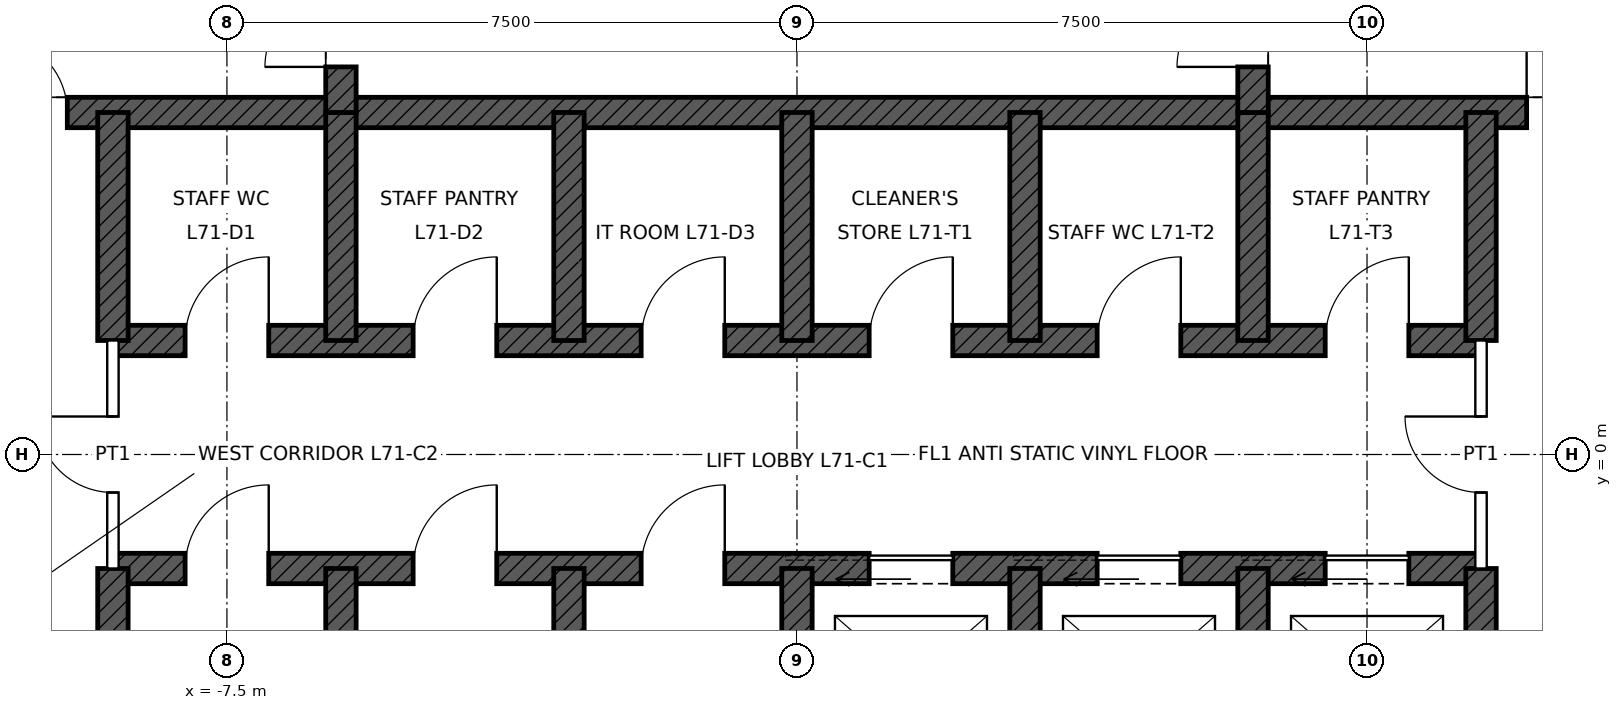
"""IFC4 building model, lengths in metres.
Left out: names, types, materials, properties, quantities, classifications, styles, units other than length and angle.
Written with IfcOpenShell. Run it as: python <this file> out.ifc"""

import sys

from ifc_helpers import new_model, si_unit, direction, frame, frame_2d, origin, place, context, subcontext, project, spatial, rectangle, extrude, element, fill, save


model = new_model("IFC4")
c1 = context("Model", 3, precision=1e-05, world=origin(), true_north=direction((0.0, 1.0)))
c2 = subcontext(c1, "Body", "Model", "MODEL_VIEW")
j1 = project(units=[si_unit("LENGTHUNIT", "METRE"), si_unit("PLANEANGLEUNIT", "RADIAN")], contexts=[c1])
p1 = place(None, origin())
s1 = spatial("IfcSite", under=j1, at=p1, CompositionType="ELEMENT")
p2 = place(p1, origin())
s2 = spatial("IfcBuilding", under=s1, at=p2, CompositionType="ELEMENT")
p3 = place(p2, frame((0.0, 0.0, 319.9)))
s3 = spatial("IfcBuildingStorey", under=s2, at=p3, CompositionType="ELEMENT", Elevation=319.9)
p4 = place(p3, frame((-11.0, 4.5, 0.0), z_axis=(0.0, 0.0, 1.0), x_axis=(1.0, 0.0, 0.0)))
e1 = element("IfcWall", 1, at=p4, inside=s3, PredefinedType="SHEAR", context=c2, shape_type="SweptSolid", body=[
    extrude(rectangle(XDim=22.0, YDim=0.4, at=frame_2d((11.0, 0.0))), origin(), (0.0, 0.0, 1.0), 4.0),
])
p5 = place(p4, frame((0.4, 0.0, 0.0)))
e2 = element("IfcOpeningElement", 2, at=p5, cuts=e1, PredefinedType="OPENING", context=c2, shape_type="SweptSolid", body=[
    extrude(rectangle(XDim=1.0, YDim=2.1, at=frame_2d((0.5, 1.05))), frame((0.0, 0.21, 0.0), z_axis=(0.0, -1.0, 0.0), x_axis=(1.0, 0.0, 0.0)), (0.0, 0.0, 1.0), 0.42),
])
p6 = place(p4, frame((20.6, 0.0, 0.0)))
e3 = element("IfcOpeningElement", 3, at=p6, cuts=e1, PredefinedType="OPENING", context=c2, shape_type="SweptSolid", body=[
    extrude(rectangle(XDim=1.0, YDim=2.1, at=frame_2d((0.5, 1.05))), frame((0.0, 0.21, 0.0), z_axis=(0.0, -1.0, 0.0), x_axis=(1.0, 0.0, 0.0)), (0.0, 0.0, 1.0), 0.42),
])
p7 = place(p3, frame((-9.0, 1.5, 0.0), z_axis=(0.0, 0.0, 1.0), x_axis=(1.0, 0.0, 0.0)))
e4 = element("IfcWall", 4, at=p7, inside=s3, PredefinedType="SHEAR", context=c2, shape_type="SweptSolid", body=[
    extrude(rectangle(XDim=18.0, YDim=0.4, at=frame_2d((9.0, 0.0))), origin(), (0.0, 0.0, 1.0), 4.0),
])
p8 = place(p7, frame((0.95, 0.0, 0.0)))
e5 = element("IfcOpeningElement", 5, at=p8, cuts=e4, PredefinedType="OPENING", context=c2, shape_type="SweptSolid", body=[
    extrude(rectangle(XDim=1.1, YDim=2.1, at=frame_2d((0.55, 1.05))), frame((0.0, 0.21, 0.0), z_axis=(0.0, -1.0, 0.0), x_axis=(1.0, 0.0, 0.0)), (0.0, 0.0, 1.0), 0.42),
])
p9 = place(p7, frame((3.95, 0.0, 0.0)))
e6 = element("IfcOpeningElement", 6, at=p9, cuts=e4, PredefinedType="OPENING", context=c2, shape_type="SweptSolid", body=[
    extrude(rectangle(XDim=1.1, YDim=2.1, at=frame_2d((0.55, 1.05))), frame((0.0, 0.21, 0.0), z_axis=(0.0, -1.0, 0.0), x_axis=(1.0, 0.0, 0.0)), (0.0, 0.0, 1.0), 0.42),
])
p10 = place(p7, frame((6.95, 0.0, 0.0)))
e7 = element("IfcOpeningElement", 7, at=p10, cuts=e4, PredefinedType="OPENING", context=c2, shape_type="SweptSolid", body=[
    extrude(rectangle(XDim=1.1, YDim=2.1, at=frame_2d((0.55, 1.05))), frame((0.0, 0.21, 0.0), z_axis=(0.0, -1.0, 0.0), x_axis=(1.0, 0.0, 0.0)), (0.0, 0.0, 1.0), 0.42),
])
p11 = place(p7, frame((9.95, 0.0, 0.0)))
e8 = element("IfcOpeningElement", 8, at=p11, cuts=e4, PredefinedType="OPENING", context=c2, shape_type="SweptSolid", body=[
    extrude(rectangle(XDim=1.1, YDim=2.1, at=frame_2d((0.55, 1.05))), frame((0.0, 0.21, 0.0), z_axis=(0.0, -1.0, 0.0), x_axis=(1.0, 0.0, 0.0)), (0.0, 0.0, 1.0), 0.42),
])
p12 = place(p7, frame((12.95, 0.0, 0.0)))
e9 = element("IfcOpeningElement", 9, at=p12, cuts=e4, PredefinedType="OPENING", context=c2, shape_type="SweptSolid", body=[
    extrude(rectangle(XDim=1.1, YDim=2.1, at=frame_2d((0.55, 1.05))), frame((0.0, 0.21, 0.0), z_axis=(0.0, -1.0, 0.0), x_axis=(1.0, 0.0, 0.0)), (0.0, 0.0, 1.0), 0.42),
])
p13 = place(p7, frame((15.95, 0.0, 0.0)))
e10 = element("IfcOpeningElement", 10, at=p13, cuts=e4, PredefinedType="OPENING", context=c2, shape_type="SweptSolid", body=[
    extrude(rectangle(XDim=1.1, YDim=2.1, at=frame_2d((0.55, 1.05))), frame((0.0, 0.21, 0.0), z_axis=(0.0, -1.0, 0.0), x_axis=(1.0, 0.0, 0.0)), (0.0, 0.0, 1.0), 0.42),
])
p14 = place(p3, frame((-9.0, -1.5, 0.0), z_axis=(0.0, 0.0, 1.0), x_axis=(1.0, 0.0, 0.0)))
e11 = element("IfcWall", 11, at=p14, inside=s3, PredefinedType="SHEAR", context=c2, shape_type="SweptSolid", body=[
    extrude(rectangle(XDim=18.0, YDim=0.4, at=frame_2d((9.0, 0.0))), origin(), (0.0, 0.0, 1.0), 4.0),
])
p15 = place(p14, frame((9.95, 0.0, 0.0)))
e12 = element("IfcOpeningElement", 12, at=p15, cuts=e11, PredefinedType="OPENING", context=c2, shape_type="SweptSolid", body=[
    extrude(rectangle(XDim=1.1, YDim=2.1, at=frame_2d((0.55, 1.05))), frame((0.0, 0.21, 0.0), z_axis=(0.0, -1.0, 0.0), x_axis=(1.0, 0.0, 0.0)), (0.0, 0.0, 1.0), 0.42),
])
p16 = place(p14, frame((12.95, 0.0, 0.0)))
e13 = element("IfcOpeningElement", 13, at=p16, cuts=e11, PredefinedType="OPENING", context=c2, shape_type="SweptSolid", body=[
    extrude(rectangle(XDim=1.1, YDim=2.1, at=frame_2d((0.55, 1.05))), frame((0.0, 0.21, 0.0), z_axis=(0.0, -1.0, 0.0), x_axis=(1.0, 0.0, 0.0)), (0.0, 0.0, 1.0), 0.42),
])
p17 = place(p14, frame((15.95, 0.0, 0.0)))
e14 = element("IfcOpeningElement", 14, at=p17, cuts=e11, PredefinedType="OPENING", context=c2, shape_type="SweptSolid", body=[
    extrude(rectangle(XDim=1.1, YDim=2.1, at=frame_2d((0.55, 1.05))), frame((0.0, 0.21, 0.0), z_axis=(0.0, -1.0, 0.0), x_axis=(1.0, 0.0, 0.0)), (0.0, 0.0, 1.0), 0.42),
])
p18 = place(p14, frame((0.95, 0.0, 0.0)))
e15 = element("IfcOpeningElement", 15, at=p18, cuts=e11, PredefinedType="OPENING", context=c2, shape_type="SweptSolid", body=[
    extrude(rectangle(XDim=1.1, YDim=2.1, at=frame_2d((0.55, 1.05))), frame((0.0, 0.21, 0.0), z_axis=(0.0, -1.0, 0.0), x_axis=(1.0, 0.0, 0.0)), (0.0, 0.0, 1.0), 0.42),
])
p19 = place(p14, frame((3.95, 0.0, 0.0)))
e16 = element("IfcOpeningElement", 16, at=p19, cuts=e11, PredefinedType="OPENING", context=c2, shape_type="SweptSolid", body=[
    extrude(rectangle(XDim=1.1, YDim=2.1, at=frame_2d((0.55, 1.05))), frame((0.0, 0.21, 0.0), z_axis=(0.0, -1.0, 0.0), x_axis=(1.0, 0.0, 0.0)), (0.0, 0.0, 1.0), 0.42),
])
p20 = place(p14, frame((6.95, 0.0, 0.0)))
e17 = element("IfcOpeningElement", 17, at=p20, cuts=e11, PredefinedType="OPENING", context=c2, shape_type="SweptSolid", body=[
    extrude(rectangle(XDim=1.1, YDim=2.1, at=frame_2d((0.55, 1.05))), frame((0.0, 0.21, 0.0), z_axis=(0.0, -1.0, 0.0), x_axis=(1.0, 0.0, 0.0)), (0.0, 0.0, 1.0), 0.42),
])
for number, where, z_axis, x_axis in (
    (18, (-9.0, 1.5, 0.0), (0.0, 0.0, 1.0), (0.0, 1.0, 0.0)),
    (19, (9.0, 1.5, 0.0), (0.0, 0.0, 1.0), (0.0, 1.0, 0.0)),
    (20, (-9.0, -4.5, 0.0), (0.0, 0.0, 1.0), (0.0, 1.0, 0.0)),
    (21, (9.0, -4.5, 0.0), (0.0, 0.0, 1.0), (0.0, 1.0, 0.0)),
    (22, (-6.0, 1.5, 0.0), (0.0, 0.0, 1.0), (0.0, 1.0, 0.0)),
    (23, (-3.0, 1.5, 0.0), (0.0, 0.0, 1.0), (0.0, 1.0, 0.0)),
    (24, (0.0, 1.5, 0.0), (0.0, 0.0, 1.0), (0.0, 1.0, 0.0)),
    (25, (3.0, 1.5, 0.0), (0.0, 0.0, 1.0), (0.0, 1.0, 0.0)),
    (26, (6.0, 1.5, 0.0), (0.0, 0.0, 1.0), (0.0, 1.0, 0.0)),
    (27, (-6.0, -4.5, 0.0), (0.0, 0.0, 1.0), (0.0, 1.0, 0.0)),
    (28, (-3.0, -4.5, 0.0), (0.0, 0.0, 1.0), (0.0, 1.0, 0.0)),
    (29, (0.0, -4.5, 0.0), (0.0, 0.0, 1.0), (0.0, 1.0, 0.0)),
    (30, (3.0, -4.5, 0.0), (0.0, 0.0, 1.0), (0.0, 1.0, 0.0)),
    (31, (6.0, -4.5, 0.0), (0.0, 0.0, 1.0), (0.0, 1.0, 0.0)),
):
    element("IfcWall", number, at=place(p3, frame(where, z_axis=z_axis, x_axis=x_axis)), inside=s3, PredefinedType="SHEAR", context=c2, shape_type="SweptSolid", body=[
        extrude(rectangle(XDim=3.0, YDim=0.4, at=frame_2d((1.5, 0.0))), origin(), (0.0, 0.0, 1.0), 4.0),
    ])
p21 = place(p3, frame((-6.0, 4.5, 0.0), z_axis=(0.0, 0.0, 1.0), x_axis=(0.0, 1.0, 0.0)))
e32 = element("IfcWall", 32, at=p21, inside=s3, PredefinedType="SHEAR", context=c2, shape_type="SweptSolid", body=[
    extrude(rectangle(XDim=6.5, YDim=0.4, at=frame_2d((3.25, 0.0))), origin(), (0.0, 0.0, 1.0), 4.0),
])
p22 = place(p21, frame((0.6, 0.0, 0.0)))
e33 = element("IfcOpeningElement", 33, at=p22, cuts=e32, PredefinedType="OPENING", context=c2, shape_type="SweptSolid", body=[
    extrude(rectangle(XDim=1.0, YDim=2.1, at=frame_2d((0.5, 1.05))), frame((0.0, 0.21, 0.0), z_axis=(0.0, -1.0, 0.0), x_axis=(1.0, 0.0, 0.0)), (0.0, 0.0, 1.0), 0.42),
])
p23 = place(p3, frame((6.0, 4.5, 0.0), z_axis=(0.0, 0.0, 1.0), x_axis=(0.0, 1.0, 0.0)))
e34 = element("IfcWall", 34, at=p23, inside=s3, PredefinedType="SHEAR", context=c2, shape_type="SweptSolid", body=[
    extrude(rectangle(XDim=6.5, YDim=0.4, at=frame_2d((3.25, 0.0))), origin(), (0.0, 0.0, 1.0), 4.0),
])
p24 = place(p23, frame((0.6, 0.0, 0.0)))
e35 = element("IfcOpeningElement", 35, at=p24, cuts=e34, PredefinedType="OPENING", context=c2, shape_type="SweptSolid", body=[
    extrude(rectangle(XDim=1.0, YDim=2.1, at=frame_2d((0.5, 1.05))), frame((0.0, 0.21, 0.0), z_axis=(0.0, -1.0, 0.0), x_axis=(1.0, 0.0, 0.0)), (0.0, 0.0, 1.0), 0.42),
])
p25 = place(p3, frame((-9.0, -1.5, 0.0), z_axis=(0.0, 0.0, 1.0), x_axis=(0.0, 1.0, 0.0)))
e36 = element("IfcWall", 36, at=p25, inside=s3, PredefinedType="PARTITIONING", context=c2, shape_type="SweptSolid", body=[
    extrude(rectangle(XDim=3.0, YDim=0.15, at=frame_2d((1.5, 0.0))), origin(), (0.0, 0.0, 1.0), 3.75),
])
p26 = place(p25, frame((1.0, 0.0, 0.0)))
e37 = element("IfcOpeningElement", 37, at=p26, cuts=e36, PredefinedType="OPENING", context=c2, shape_type="SweptSolid", body=[
    extrude(rectangle(XDim=1.0, YDim=2.4, at=frame_2d((0.5, 1.2))), frame((0.0, 0.085, 0.0), z_axis=(0.0, -1.0, 0.0), x_axis=(1.0, 0.0, 0.0)), (0.0, 0.0, 1.0), 0.17),
])
p27 = place(p3, frame((9.0, -1.5, 0.0), z_axis=(0.0, 0.0, 1.0), x_axis=(0.0, 1.0, 0.0)))
e38 = element("IfcWall", 38, at=p27, inside=s3, PredefinedType="PARTITIONING", context=c2, shape_type="SweptSolid", body=[
    extrude(rectangle(XDim=3.0, YDim=0.15, at=frame_2d((1.5, 0.0))), origin(), (0.0, 0.0, 1.0), 3.75),
])
p28 = place(p27, frame((1.0, 0.0, 0.0)))
e39 = element("IfcOpeningElement", 39, at=p28, cuts=e38, PredefinedType="OPENING", context=c2, shape_type="SweptSolid", body=[
    extrude(rectangle(XDim=1.0, YDim=2.4, at=frame_2d((0.5, 1.2))), frame((0.0, 0.085, 0.0), z_axis=(0.0, -1.0, 0.0), x_axis=(1.0, 0.0, 0.0)), (0.0, 0.0, 1.0), 0.17),
])
p29 = place(p5, origin())
e40 = element("IfcDoor", 40, at=p29, inside=s3, OperationType="SINGLE_SWING_LEFT", PredefinedType="DOOR", context=c2, shape_type="SweptSolid", body=[
    extrude(rectangle(XDim=1.0, YDim=2.1, at=frame_2d((0.5, 1.05))), frame((0.0, 0.025, 0.0), z_axis=(0.0, -1.0, 0.0), x_axis=(1.0, 0.0, 0.0)), (0.0, 0.0, 1.0), 0.05),
])
fill(e2, e40)
p30 = place(p6, origin())
e41 = element("IfcDoor", 41, at=p30, inside=s3, OperationType="SINGLE_SWING_LEFT", PredefinedType="DOOR", context=c2, shape_type="SweptSolid", body=[
    extrude(rectangle(XDim=1.0, YDim=2.1, at=frame_2d((0.5, 1.05))), frame((0.0, 0.025, 0.0), z_axis=(0.0, -1.0, 0.0), x_axis=(1.0, 0.0, 0.0)), (0.0, 0.0, 1.0), 0.05),
])
fill(e3, e41)
p31 = place(p22, origin())
e42 = element("IfcDoor", 42, at=p31, inside=s3, OperationType="SINGLE_SWING_LEFT", PredefinedType="DOOR", context=c2, shape_type="SweptSolid", body=[
    extrude(rectangle(XDim=1.0, YDim=2.1, at=frame_2d((0.5, 1.05))), frame((0.0, 0.025, 0.0), z_axis=(0.0, -1.0, 0.0), x_axis=(1.0, 0.0, 0.0)), (0.0, 0.0, 1.0), 0.05),
])
fill(e33, e42)
p32 = place(p24, origin())
e43 = element("IfcDoor", 43, at=p32, inside=s3, OperationType="SINGLE_SWING_LEFT", PredefinedType="DOOR", context=c2, shape_type="SweptSolid", body=[
    extrude(rectangle(XDim=1.0, YDim=2.1, at=frame_2d((0.5, 1.05))), frame((0.0, 0.025, 0.0), z_axis=(0.0, -1.0, 0.0), x_axis=(1.0, 0.0, 0.0)), (0.0, 0.0, 1.0), 0.05),
])
fill(e35, e43)
p33 = place(p15, origin())
e44 = element("IfcDoor", 44, at=p33, inside=s3, OperationType="SLIDING_TO_LEFT", PredefinedType="DOOR", context=c2, shape_type="SweptSolid", body=[
    extrude(rectangle(XDim=1.1, YDim=2.1, at=frame_2d((0.55, 1.05))), frame((0.0, 0.025, 0.0), z_axis=(0.0, -1.0, 0.0), x_axis=(1.0, 0.0, 0.0)), (0.0, 0.0, 1.0), 0.05),
])
fill(e12, e44)
p34 = place(p16, origin())
e45 = element("IfcDoor", 45, at=p34, inside=s3, OperationType="SLIDING_TO_LEFT", PredefinedType="DOOR", context=c2, shape_type="SweptSolid", body=[
    extrude(rectangle(XDim=1.1, YDim=2.1, at=frame_2d((0.55, 1.05))), frame((0.0, 0.025, 0.0), z_axis=(0.0, -1.0, 0.0), x_axis=(1.0, 0.0, 0.0)), (0.0, 0.0, 1.0), 0.05),
])
fill(e13, e45)
p35 = place(p17, origin())
e46 = element("IfcDoor", 46, at=p35, inside=s3, OperationType="SLIDING_TO_LEFT", PredefinedType="DOOR", context=c2, shape_type="SweptSolid", body=[
    extrude(rectangle(XDim=1.1, YDim=2.1, at=frame_2d((0.55, 1.05))), frame((0.0, 0.025, 0.0), z_axis=(0.0, -1.0, 0.0), x_axis=(1.0, 0.0, 0.0)), (0.0, 0.0, 1.0), 0.05),
])
fill(e14, e46)
p36 = place(p26, origin())
e47 = element("IfcDoor", 47, at=p36, inside=s3, OperationType="SINGLE_SWING_RIGHT", PredefinedType="DOOR", context=c2, shape_type="SweptSolid", body=[
    extrude(rectangle(XDim=1.0, YDim=2.4, at=frame_2d((0.5, 1.2))), frame((0.0, 0.025, 0.0), z_axis=(0.0, -1.0, 0.0), x_axis=(1.0, 0.0, 0.0)), (0.0, 0.0, 1.0), 0.05),
])
fill(e37, e47)
p37 = place(p28, origin())
e48 = element("IfcDoor", 48, at=p37, inside=s3, OperationType="SINGLE_SWING_RIGHT", PredefinedType="DOOR", context=c2, shape_type="SweptSolid", body=[
    extrude(rectangle(XDim=1.0, YDim=2.4, at=frame_2d((0.5, 1.2))), frame((0.0, 0.025, 0.0), z_axis=(0.0, -1.0, 0.0), x_axis=(1.0, 0.0, 0.0)), (0.0, 0.0, 1.0), 0.05),
])
fill(e39, e48)
p38 = place(p8, origin())
e49 = element("IfcDoor", 49, at=p38, inside=s3, OperationType="SINGLE_SWING_RIGHT", PredefinedType="DOOR", context=c2, shape_type="SweptSolid", body=[
    extrude(rectangle(XDim=1.1, YDim=2.1, at=frame_2d((0.55, 1.05))), frame((0.0, 0.025, 0.0), z_axis=(0.0, -1.0, 0.0), x_axis=(1.0, 0.0, 0.0)), (0.0, 0.0, 1.0), 0.05),
])
fill(e5, e49)
p39 = place(p9, origin())
e50 = element("IfcDoor", 50, at=p39, inside=s3, OperationType="SINGLE_SWING_RIGHT", PredefinedType="DOOR", context=c2, shape_type="SweptSolid", body=[
    extrude(rectangle(XDim=1.1, YDim=2.1, at=frame_2d((0.55, 1.05))), frame((0.0, 0.025, 0.0), z_axis=(0.0, -1.0, 0.0), x_axis=(1.0, 0.0, 0.0)), (0.0, 0.0, 1.0), 0.05),
])
fill(e6, e50)
p40 = place(p10, origin())
e51 = element("IfcDoor", 51, at=p40, inside=s3, OperationType="SINGLE_SWING_RIGHT", PredefinedType="DOOR", context=c2, shape_type="SweptSolid", body=[
    extrude(rectangle(XDim=1.1, YDim=2.1, at=frame_2d((0.55, 1.05))), frame((0.0, 0.025, 0.0), z_axis=(0.0, -1.0, 0.0), x_axis=(1.0, 0.0, 0.0)), (0.0, 0.0, 1.0), 0.05),
])
fill(e7, e51)
p41 = place(p11, origin())
e52 = element("IfcDoor", 52, at=p41, inside=s3, OperationType="SINGLE_SWING_RIGHT", PredefinedType="DOOR", context=c2, shape_type="SweptSolid", body=[
    extrude(rectangle(XDim=1.1, YDim=2.1, at=frame_2d((0.55, 1.05))), frame((0.0, 0.025, 0.0), z_axis=(0.0, -1.0, 0.0), x_axis=(1.0, 0.0, 0.0)), (0.0, 0.0, 1.0), 0.05),
])
fill(e8, e52)
p42 = place(p12, origin())
e53 = element("IfcDoor", 53, at=p42, inside=s3, OperationType="SINGLE_SWING_RIGHT", PredefinedType="DOOR", context=c2, shape_type="SweptSolid", body=[
    extrude(rectangle(XDim=1.1, YDim=2.1, at=frame_2d((0.55, 1.05))), frame((0.0, 0.025, 0.0), z_axis=(0.0, -1.0, 0.0), x_axis=(1.0, 0.0, 0.0)), (0.0, 0.0, 1.0), 0.05),
])
fill(e9, e53)
p43 = place(p13, origin())
e54 = element("IfcDoor", 54, at=p43, inside=s3, OperationType="SINGLE_SWING_RIGHT", PredefinedType="DOOR", context=c2, shape_type="SweptSolid", body=[
    extrude(rectangle(XDim=1.1, YDim=2.1, at=frame_2d((0.55, 1.05))), frame((0.0, 0.025, 0.0), z_axis=(0.0, -1.0, 0.0), x_axis=(1.0, 0.0, 0.0)), (0.0, 0.0, 1.0), 0.05),
])
fill(e10, e54)
p44 = place(p18, origin())
e55 = element("IfcDoor", 55, at=p44, inside=s3, OperationType="SINGLE_SWING_RIGHT", PredefinedType="DOOR", context=c2, shape_type="SweptSolid", body=[
    extrude(rectangle(XDim=1.1, YDim=2.1, at=frame_2d((0.55, 1.05))), frame((0.0, 0.025, 0.0), z_axis=(0.0, -1.0, 0.0), x_axis=(1.0, 0.0, 0.0)), (0.0, 0.0, 1.0), 0.05),
])
fill(e15, e55)
p45 = place(p19, origin())
e56 = element("IfcDoor", 56, at=p45, inside=s3, OperationType="SINGLE_SWING_RIGHT", PredefinedType="DOOR", context=c2, shape_type="SweptSolid", body=[
    extrude(rectangle(XDim=1.1, YDim=2.1, at=frame_2d((0.55, 1.05))), frame((0.0, 0.025, 0.0), z_axis=(0.0, -1.0, 0.0), x_axis=(1.0, 0.0, 0.0)), (0.0, 0.0, 1.0), 0.05),
])
fill(e16, e56)
p46 = place(p20, origin())
e57 = element("IfcDoor", 57, at=p46, inside=s3, OperationType="SINGLE_SWING_RIGHT", PredefinedType="DOOR", context=c2, shape_type="SweptSolid", body=[
    extrude(rectangle(XDim=1.1, YDim=2.1, at=frame_2d((0.55, 1.05))), frame((0.0, 0.025, 0.0), z_axis=(0.0, -1.0, 0.0), x_axis=(1.0, 0.0, 0.0)), (0.0, 0.0, 1.0), 0.05),
])
fill(e17, e57)
save(model, sys.argv[1])
